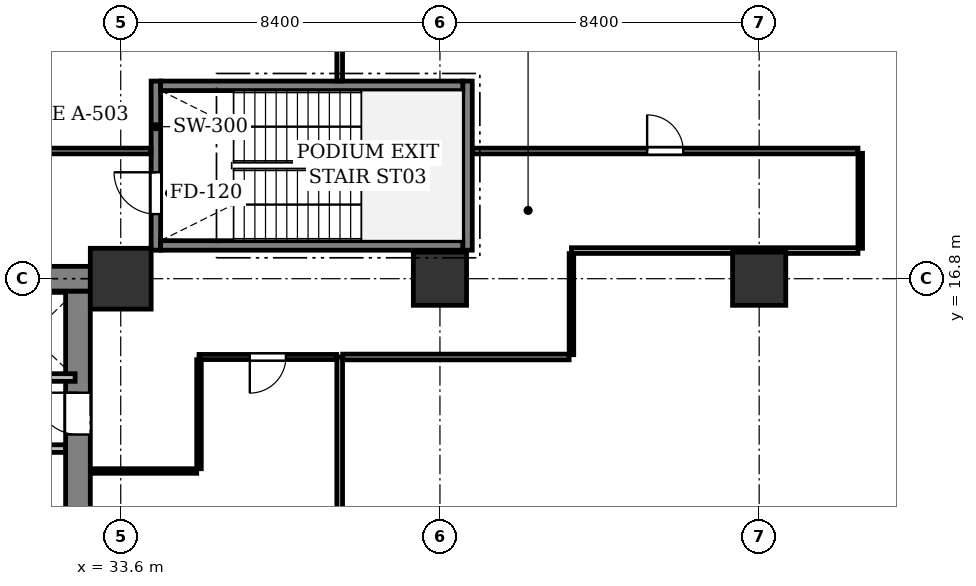
"""IFC4 building model, lengths in metres.
Left out: names, types, materials, properties, quantities, classifications, styles, units other than length and angle.
Written with IfcOpenShell. Run it as: python <this file> out.ifc"""

import sys

from ifc_helpers import new_model, si_unit, direction, frame, frame_2d, origin, origin_2d, place, context, subcontext, project, spatial, rectangle, extrude, element, fill, save


model = new_model("IFC4")
c1 = context("Model", 3, precision=1e-05, world=origin(), true_north=direction((0.0, 1.0)))
c2 = subcontext(c1, "Body", "Model", "MODEL_VIEW")
j1 = project(units=[si_unit("LENGTHUNIT", "METRE"), si_unit("PLANEANGLEUNIT", "RADIAN")], contexts=[c1])
p1 = place(None, origin())
s1 = spatial("IfcSite", under=j1, at=p1, CompositionType="ELEMENT")
p2 = place(p1, origin())
s2 = spatial("IfcBuilding", under=s1, at=p2, CompositionType="ELEMENT")
p3 = place(p2, frame((0.0, 0.0, 5.4)))
s3 = spatial("IfcBuildingStorey", under=s2, at=p3, CompositionType="ELEMENT", Elevation=5.4)
p4 = place(p3, frame((33.6, 16.8, 0.0), z_axis=(0.0, 0.0, 1.0), x_axis=(1.0, 0.0, 0.0)))
e1 = element("IfcColumn", 1, at=p4, inside=s3, PredefinedType="COLUMN", context=c2, shape_type="SweptSolid", body=[
    extrude(rectangle(XDim=1.6, YDim=1.6, at=origin_2d()), origin(), (0.0, 0.0, 1.0), 4.8),
])
for number, where, z_axis, x_axis in (
    (2, (42.0, 16.8, 0.0), (0.0, 0.0, 1.0), (1.0, 0.0, 0.0)),
    (3, (50.4, 16.8, 0.0), (0.0, 0.0, 1.0), (1.0, 0.0, 0.0)),
):
    element("IfcColumn", number, at=place(p3, frame(where, z_axis=z_axis, x_axis=x_axis)), inside=s3, PredefinedType="COLUMN", context=c2, shape_type="SweptSolid", body=[
        extrude(rectangle(XDim=1.4, YDim=1.4, at=origin_2d()), origin(), (0.0, 0.0, 1.0), 4.8),
    ])
p5 = place(p3, frame((32.475, 8.725, 0.0), z_axis=(0.0, 0.0, 1.0), x_axis=(0.0, 1.0, 0.0)))
e4 = element("IfcWall", 4, at=p5, inside=s3, PredefinedType="SHEAR", context=c2, shape_type="SweptSolid", body=[
    extrude(rectangle(XDim=7.75, YDim=0.65, at=frame_2d((3.875, 0.0))), origin(), (0.0, 0.0, 1.0), 4.525),
])
p6 = place(p5, frame((3.975, 0.0, 0.0)))
e5 = element("IfcOpeningElement", 5, at=p6, cuts=e4, PredefinedType="OPENING", context=c2, shape_type="SweptSolid", body=[
    extrude(rectangle(XDim=1.1, YDim=2.15, at=frame_2d((0.55, 1.075))), frame((0.0, 0.335, 0.0), z_axis=(0.0, -1.0, 0.0), x_axis=(1.0, 0.0, 0.0)), (0.0, 0.0, 1.0), 0.67),
])
p7 = place(p3, frame((26.0, 16.8, 0.0), z_axis=(0.0, 0.0, 1.0), x_axis=(1.0, 0.0, 0.0)))
e6 = element("IfcWall", 6, at=p7, inside=s3, PredefinedType="SHEAR", context=c2, shape_type="SweptSolid", body=[
    extrude(rectangle(XDim=6.8, YDim=0.65, at=frame_2d((3.4, 0.0))), origin(), (0.0, 0.0, 1.0), 4.525),
])
p8 = place(p3, frame((34.525, 17.55, 0.0), z_axis=(0.0, 0.0, 1.0), x_axis=(0.0, 1.0, 0.0)))
e7 = element("IfcWall", 7, at=p8, inside=s3, PredefinedType="SHEAR", context=c2, shape_type="SweptSolid", body=[
    extrude(rectangle(XDim=4.45, YDim=0.25, at=frame_2d((2.225, 0.0))), origin(), (0.0, 0.0, 1.0), 4.525),
])
p9 = place(p8, frame((0.95, 0.0, 0.0)))
e8 = element("IfcOpeningElement", 8, at=p9, cuts=e7, PredefinedType="OPENING", context=c2, shape_type="SweptSolid", body=[
    extrude(rectangle(XDim=1.1, YDim=2.15, at=frame_2d((0.55, 1.075))), frame((0.0, 0.135, 0.0), z_axis=(0.0, -1.0, 0.0), x_axis=(1.0, 0.0, 0.0)), (0.0, 0.0, 1.0), 0.27),
])
p10 = place(p3, frame((42.725, 17.55, 0.0), z_axis=(0.0, 0.0, 1.0), x_axis=(0.0, 1.0, 0.0)))
e9 = element("IfcWall", 9, at=p10, inside=s3, PredefinedType="SHEAR", context=c2, shape_type="SweptSolid", body=[
    extrude(rectangle(XDim=4.45, YDim=0.25, at=frame_2d((2.225, 0.0))), origin(), (0.0, 0.0, 1.0), 4.525),
])
for number, where, z_axis, x_axis in (
    (10, (34.65, 17.675, 0.0), (0.0, 0.0, 1.0), (1.0, 0.0, 0.0)),
    (11, (34.65, 21.875, 0.0), (0.0, 0.0, 1.0), (1.0, 0.0, 0.0)),
):
    element("IfcWall", number, at=place(p3, frame(where, z_axis=z_axis, x_axis=x_axis)), inside=s3, PredefinedType="SHEAR", context=c2, shape_type="SweptSolid", body=[
        extrude(rectangle(XDim=7.95, YDim=0.25, at=frame_2d((3.975, 0.0))), origin(), (0.0, 0.0, 1.0), 4.525),
    ])
p11 = place(p3, frame((30.05, 14.2, 0.0), z_axis=(0.0, 0.0, 1.0), x_axis=(1.0, 0.0, 0.0)))
e12 = element("IfcWall", 12, at=p11, inside=s3, PredefinedType="PARTITIONING", context=c2, shape_type="SweptSolid", body=[
    extrude(rectangle(XDim=2.35, YDim=0.2, at=frame_2d((1.175, 0.0))), origin(), (0.0, 0.0, 1.0), 4.525),
])
p12 = place(p3, frame((32.146, 12.33, 0.0), z_axis=(0.0, 0.0, 1.0), x_axis=(-1.0, 0.0, 0.0)))
e13 = element("IfcWall", 13, at=p12, inside=s3, PredefinedType="PARTITIONING", context=c2, shape_type="SweptSolid", body=[
    extrude(rectangle(XDim=2.296, YDim=0.2, at=frame_2d((1.148, 0.0))), origin(), (0.0, 0.0, 1.0), 4.525),
])
p13 = place(p12, frame((0.723, 0.0, 0.0)))
e14 = element("IfcOpeningElement", 14, at=p13, cuts=e13, PredefinedType="OPENING", context=c2, shape_type="SweptSolid", body=[
    extrude(rectangle(XDim=0.85, YDim=2.15, at=frame_2d((0.425, 1.075))), frame((0.0, 0.11, 0.0), z_axis=(0.0, -1.0, 0.0), x_axis=(1.0, 0.0, 0.0)), (0.0, 0.0, 1.0), 0.22),
])
p14 = place(p3, frame((39.362, 0.124, 0.0), z_axis=(0.0, 0.0, 1.0), x_axis=(0.0, 1.0, 0.0)))
e15 = element("IfcWall", 15, at=p14, inside=s3, PredefinedType="PARTITIONING", context=c2, shape_type="SweptSolid", body=[
    extrude(rectangle(XDim=14.616, YDim=0.15, at=frame_2d((7.308, 0.0))), origin(), (0.0, 0.0, 1.0), 3.725),
])
p15 = place(p3, frame((39.283, 14.74, 0.0), z_axis=(0.0, 0.0, 1.0), x_axis=(-1.0, 0.0, 0.0)))
e16 = element("IfcWall", 16, at=p15, inside=s3, PredefinedType="PARTITIONING", context=c2, shape_type="SweptSolid", body=[
    extrude(rectangle(XDim=3.623, YDim=0.135, at=frame_2d((1.812, 0.0))), origin(), (0.0, 0.0, 1.0), 4.122),
])
p16 = place(p15, frame((1.336, 0.0, 0.0)))
e17 = element("IfcOpeningElement", 17, at=p16, cuts=e16, PredefinedType="OPENING", context=c2, shape_type="SweptSolid", body=[
    extrude(rectangle(XDim=0.95, YDim=2.15, at=frame_2d((0.475, 1.075))), frame((0.0, 0.077, 0.0), z_axis=(0.0, -1.0, 0.0), x_axis=(1.0, 0.0, 0.0)), (0.0, 0.0, 1.0), 0.155),
])
p17 = place(p3, frame((35.66, 14.668, 0.0), z_axis=(0.0, 0.0, 1.0), x_axis=(0.0, -1.0, 0.0)))
e18 = element("IfcWall", 18, at=p17, inside=s3, PredefinedType="PARTITIONING", context=c2, shape_type="SweptSolid", body=[
    extrude(rectangle(XDim=2.868, YDim=0.12, at=frame_2d((1.434, 0.0))), origin(), (0.0, 0.0, 1.0), 4.525),
])
p18 = place(p3, frame((35.6, 11.74, 0.0), z_axis=(0.0, 0.0, 1.0), x_axis=(-1.0, 0.0, 0.0)))
e19 = element("IfcWall", 19, at=p18, inside=s3, PredefinedType="PARTITIONING", context=c2, shape_type="SweptSolid", body=[
    extrude(rectangle(XDim=2.796, YDim=0.12, at=frame_2d((1.398, 0.0))), origin(), (0.0, 0.0, 1.0), 3.913),
])
p19 = place(p3, frame((39.362, 22.004, 0.0), z_axis=(0.0, 0.0, 1.0), x_axis=(0.0, 1.0, 0.0)))
e20 = element("IfcWall", 20, at=p19, inside=s3, PredefinedType="PARTITIONING", context=c2, shape_type="SweptSolid", body=[
    extrude(rectangle(XDim=28.227, YDim=0.15, at=frame_2d((14.114, 0.0))), origin(), (0.0, 0.0, 1.0), 3.725),
])
p20 = place(p3, frame((20.044, 20.16, 0.0), z_axis=(0.0, 0.0, 1.0), x_axis=(1.0, 0.0, 0.0)))
e21 = element("IfcWall", 21, at=p20, inside=s3, PredefinedType="PARTITIONING", context=c2, shape_type="SweptSolid", body=[
    extrude(rectangle(XDim=14.352, YDim=0.15, at=frame_2d((7.176, 0.0))), origin(), (0.0, 0.0, 1.0), 3.913),
])
p21 = place(p3, frame((45.4, 14.74, 0.0), z_axis=(0.0, 0.0, 1.0), x_axis=(-1.0, 0.0, 0.0)))
e22 = element("IfcWall", 22, at=p21, inside=s3, PredefinedType="PARTITIONING", context=c2, shape_type="SweptSolid", body=[
    extrude(rectangle(XDim=5.959, YDim=0.15, at=frame_2d((2.979, 0.0))), origin(), (0.0, 0.0, 1.0), 3.913),
])
p22 = place(p3, frame((42.854, 20.16, 0.0), z_axis=(0.0, 0.0, 1.0), x_axis=(1.0, 0.0, 0.0)))
e23 = element("IfcWall", 23, at=p22, inside=s3, PredefinedType="PARTITIONING", context=c2, shape_type="SweptSolid", body=[
    extrude(rectangle(XDim=10.146, YDim=0.15, at=frame_2d((5.073, 0.0))), origin(), (0.0, 0.0, 1.0), 3.913),
])
p23 = place(p22, frame((4.598, 0.0, 0.0)))
e24 = element("IfcOpeningElement", 24, at=p23, cuts=e23, PredefinedType="OPENING", context=c2, shape_type="SweptSolid", body=[
    extrude(rectangle(XDim=0.95, YDim=2.15, at=frame_2d((0.475, 1.075))), frame((0.0, 0.085, 0.0), z_axis=(0.0, -1.0, 0.0), x_axis=(1.0, 0.0, 0.0)), (0.0, 0.0, 1.0), 0.17),
])
p24 = place(p3, frame((53.06, 20.1, 0.0), z_axis=(0.0, 0.0, 1.0), x_axis=(0.0, -1.0, 0.0)))
e25 = element("IfcWall", 25, at=p24, inside=s3, PredefinedType="PARTITIONING", context=c2, shape_type="SweptSolid", body=[
    extrude(rectangle(XDim=2.5, YDim=0.12, at=frame_2d((1.25, 0.0))), origin(), (0.0, 0.0, 1.0), 4.525),
])
p25 = place(p3, frame((53.0, 17.54, 0.0), z_axis=(0.0, 0.0, 1.0), x_axis=(-1.0, 0.0, 0.0)))
e26 = element("IfcWall", 26, at=p25, inside=s3, PredefinedType="PARTITIONING", context=c2, shape_type="SweptSolid", body=[
    extrude(rectangle(XDim=7.54, YDim=0.15, at=frame_2d((3.77, 0.0))), origin(), (0.0, 0.0, 1.0), 3.913),
])
p26 = place(p3, frame((45.46, 17.461, 0.0), z_axis=(0.0, 0.0, 1.0), x_axis=(0.0, -1.0, 0.0)))
e27 = element("IfcWall", 27, at=p26, inside=s3, PredefinedType="PARTITIONING", context=c2, shape_type="SweptSolid", body=[
    extrude(rectangle(XDim=2.661, YDim=0.12, at=frame_2d((1.331, 0.0))), origin(), (0.0, 0.0, 1.0), 3.725),
])
p27 = place(p6, origin())
e28 = element("IfcDoor", 28, at=p27, inside=s3, OperationType="SINGLE_SWING_RIGHT", PredefinedType="DOOR", context=c2, shape_type="SweptSolid", body=[
    extrude(rectangle(XDim=1.1, YDim=2.15, at=frame_2d((0.55, 1.075))), frame((0.0, 0.025, 0.0), z_axis=(0.0, -1.0, 0.0), x_axis=(1.0, 0.0, 0.0)), (0.0, 0.0, 1.0), 0.05),
])
fill(e5, e28)
p28 = place(p9, origin())
e29 = element("IfcDoor", 29, at=p28, inside=s3, OperationType="SINGLE_SWING_RIGHT", PredefinedType="DOOR", context=c2, shape_type="SweptSolid", body=[
    extrude(rectangle(XDim=1.1, YDim=2.15, at=frame_2d((0.55, 1.075))), frame((0.0, 0.025, 0.0), z_axis=(0.0, -1.0, 0.0), x_axis=(1.0, 0.0, 0.0)), (0.0, 0.0, 1.0), 0.05),
])
fill(e8, e29)
p29 = place(p16, origin())
e30 = element("IfcDoor", 30, at=p29, inside=s3, OperationType="SINGLE_SWING_RIGHT", PredefinedType="DOOR", context=c2, shape_type="SweptSolid", body=[
    extrude(rectangle(XDim=0.95, YDim=2.15, at=frame_2d((0.475, 1.075))), frame((0.0, 0.025, 0.0), z_axis=(0.0, -1.0, 0.0), x_axis=(1.0, 0.0, 0.0)), (0.0, 0.0, 1.0), 0.05),
])
fill(e17, e30)
p30 = place(p23, origin())
e31 = element("IfcDoor", 31, at=p30, inside=s3, OperationType="SINGLE_SWING_LEFT", PredefinedType="DOOR", context=c2, shape_type="SweptSolid", body=[
    extrude(rectangle(XDim=0.95, YDim=2.15, at=frame_2d((0.475, 1.075))), frame((0.0, 0.025, 0.0), z_axis=(0.0, -1.0, 0.0), x_axis=(1.0, 0.0, 0.0)), (0.0, 0.0, 1.0), 0.05),
])
fill(e24, e31)
save(model, sys.argv[1])
